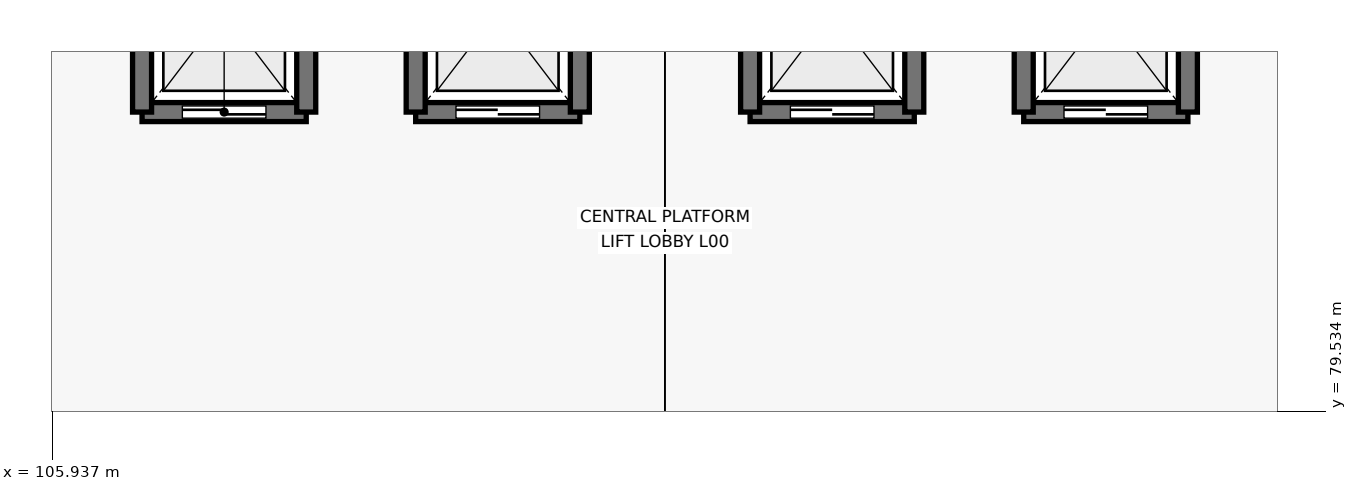
"""IFC4 building model, lengths in metres.
Left out: names, types, materials, properties, quantities, classifications, styles, units other than length and angle.
Written with IfcOpenShell. Run it as: python <this file> out.ifc"""

import sys

from ifc_helpers import new_model, si_unit, direction, frame, frame_2d, origin, place, context, subcontext, project, spatial, rectangle, extrude, element, fill, save


model = new_model("IFC4")
c1 = context("Model", 3, precision=1e-05, world=origin(), true_north=direction((0.0, 1.0)))
c2 = subcontext(c1, "Body", "Model", "MODEL_VIEW")
j1 = project(units=[si_unit("LENGTHUNIT", "METRE"), si_unit("PLANEANGLEUNIT", "RADIAN")], contexts=[c1])
p1 = place(None, origin())
s1 = spatial("IfcSite", under=j1, at=p1, CompositionType="ELEMENT")
p2 = place(p1, origin())
s2 = spatial("IfcBuilding", under=s1, at=p2, CompositionType="ELEMENT")
p3 = place(p2, origin())
s3 = spatial("IfcBuildingStorey", under=s2, at=p3, CompositionType="ELEMENT", Elevation=0.0)
p4 = place(p3, frame((107.12, 83.47, 0.0), z_axis=(0.0, 0.0, 1.0), x_axis=(1.0, 0.0, 0.0)))
e1 = element("IfcWall", 1, at=p4, inside=s3, PredefinedType="SHEAR", context=c2, shape_type="SweptSolid", body=[
    extrude(rectangle(XDim=2.16, YDim=0.25, at=frame_2d((1.08, 0.0))), origin(), (0.0, 0.0, 1.0), 5.18),
])
p5 = place(p4, frame((0.53, 0.0, 0.0)))
e2 = element("IfcOpeningElement", 2, at=p5, cuts=e1, PredefinedType="OPENING", context=c2, shape_type="SweptSolid", body=[
    extrude(rectangle(XDim=1.1, YDim=2.2, at=frame_2d((0.55, 1.1))), frame((0.0, 0.135, 0.0), z_axis=(0.0, -1.0, 0.0), x_axis=(1.0, 0.0, 0.0)), (0.0, 0.0, 1.0), 0.27),
])
for number, where, z_axis, x_axis in (
    (3, (109.28, 83.47, 0.0), (0.0, 0.0, 1.0), (0.0, 1.0, 0.0)),
    (4, (107.12, 86.13, 0.0), (0.0, 0.0, 1.0), (0.0, -1.0, 0.0)),
):
    element("IfcWall", number, at=place(p3, frame(where, z_axis=z_axis, x_axis=x_axis)), inside=s3, PredefinedType="SHEAR", context=c2, shape_type="SweptSolid", body=[
        extrude(rectangle(XDim=2.66, YDim=0.25, at=frame_2d((1.33, 0.0))), origin(), (0.0, 0.0, 1.0), 5.18),
    ])
p6 = place(p3, frame((110.72, 83.47, 0.0), z_axis=(0.0, 0.0, 1.0), x_axis=(1.0, 0.0, 0.0)))
e5 = element("IfcWall", 5, at=p6, inside=s3, PredefinedType="SHEAR", context=c2, shape_type="SweptSolid", body=[
    extrude(rectangle(XDim=2.16, YDim=0.25, at=frame_2d((1.08, 0.0))), origin(), (0.0, 0.0, 1.0), 5.18),
])
p7 = place(p6, frame((0.53, 0.0, 0.0)))
e6 = element("IfcOpeningElement", 6, at=p7, cuts=e5, PredefinedType="OPENING", context=c2, shape_type="SweptSolid", body=[
    extrude(rectangle(XDim=1.1, YDim=2.2, at=frame_2d((0.55, 1.1))), frame((0.0, 0.135, 0.0), z_axis=(0.0, -1.0, 0.0), x_axis=(1.0, 0.0, 0.0)), (0.0, 0.0, 1.0), 0.27),
])
for number, where, z_axis, x_axis in (
    (7, (112.88, 83.47, 0.0), (0.0, 0.0, 1.0), (0.0, 1.0, 0.0)),
    (8, (110.72, 86.13, 0.0), (0.0, 0.0, 1.0), (0.0, -1.0, 0.0)),
):
    element("IfcWall", number, at=place(p3, frame(where, z_axis=z_axis, x_axis=x_axis)), inside=s3, PredefinedType="SHEAR", context=c2, shape_type="SweptSolid", body=[
        extrude(rectangle(XDim=2.66, YDim=0.25, at=frame_2d((1.33, 0.0))), origin(), (0.0, 0.0, 1.0), 5.18),
    ])
p8 = place(p3, frame((115.12, 83.47, 0.0), z_axis=(0.0, 0.0, 1.0), x_axis=(1.0, 0.0, 0.0)))
e9 = element("IfcWall", 9, at=p8, inside=s3, PredefinedType="SHEAR", context=c2, shape_type="SweptSolid", body=[
    extrude(rectangle(XDim=2.16, YDim=0.25, at=frame_2d((1.08, 0.0))), origin(), (0.0, 0.0, 1.0), 5.18),
])
p9 = place(p8, frame((0.53, 0.0, 0.0)))
e10 = element("IfcOpeningElement", 10, at=p9, cuts=e9, PredefinedType="OPENING", context=c2, shape_type="SweptSolid", body=[
    extrude(rectangle(XDim=1.1, YDim=2.2, at=frame_2d((0.55, 1.1))), frame((0.0, 0.135, 0.0), z_axis=(0.0, -1.0, 0.0), x_axis=(1.0, 0.0, 0.0)), (0.0, 0.0, 1.0), 0.27),
])
for number, where, z_axis, x_axis in (
    (11, (117.28, 83.47, 0.0), (0.0, 0.0, 1.0), (0.0, 1.0, 0.0)),
    (12, (115.12, 86.13, 0.0), (0.0, 0.0, 1.0), (0.0, -1.0, 0.0)),
):
    element("IfcWall", number, at=place(p3, frame(where, z_axis=z_axis, x_axis=x_axis)), inside=s3, PredefinedType="SHEAR", context=c2, shape_type="SweptSolid", body=[
        extrude(rectangle(XDim=2.66, YDim=0.25, at=frame_2d((1.33, 0.0))), origin(), (0.0, 0.0, 1.0), 5.18),
    ])
p10 = place(p3, frame((118.72, 83.47, 0.0), z_axis=(0.0, 0.0, 1.0), x_axis=(1.0, 0.0, 0.0)))
e13 = element("IfcWall", 13, at=p10, inside=s3, PredefinedType="SHEAR", context=c2, shape_type="SweptSolid", body=[
    extrude(rectangle(XDim=2.16, YDim=0.25, at=frame_2d((1.08, 0.0))), origin(), (0.0, 0.0, 1.0), 5.18),
])
p11 = place(p10, frame((0.53, 0.0, 0.0)))
e14 = element("IfcOpeningElement", 14, at=p11, cuts=e13, PredefinedType="OPENING", context=c2, shape_type="SweptSolid", body=[
    extrude(rectangle(XDim=1.1, YDim=2.2, at=frame_2d((0.55, 1.1))), frame((0.0, 0.135, 0.0), z_axis=(0.0, -1.0, 0.0), x_axis=(1.0, 0.0, 0.0)), (0.0, 0.0, 1.0), 0.27),
])
for number, where, z_axis, x_axis in (
    (15, (120.88, 83.47, 0.0), (0.0, 0.0, 1.0), (0.0, 1.0, 0.0)),
    (16, (118.72, 86.13, 0.0), (0.0, 0.0, 1.0), (0.0, -1.0, 0.0)),
):
    element("IfcWall", number, at=place(p3, frame(where, z_axis=z_axis, x_axis=x_axis)), inside=s3, PredefinedType="SHEAR", context=c2, shape_type="SweptSolid", body=[
        extrude(rectangle(XDim=2.66, YDim=0.25, at=frame_2d((1.33, 0.0))), origin(), (0.0, 0.0, 1.0), 5.18),
    ])
p12 = place(p5, origin())
e17 = element("IfcDoor", 17, at=p12, inside=s3, OperationType="SLIDING_TO_RIGHT", PredefinedType="DOOR", context=c2, shape_type="SweptSolid", body=[
    extrude(rectangle(XDim=1.1, YDim=2.2, at=frame_2d((0.55, 1.1))), frame((0.0, 0.025, 0.0), z_axis=(0.0, -1.0, 0.0), x_axis=(1.0, 0.0, 0.0)), (0.0, 0.0, 1.0), 0.05),
])
fill(e2, e17)
p13 = place(p7, origin())
e18 = element("IfcDoor", 18, at=p13, inside=s3, OperationType="SLIDING_TO_RIGHT", PredefinedType="DOOR", context=c2, shape_type="SweptSolid", body=[
    extrude(rectangle(XDim=1.1, YDim=2.2, at=frame_2d((0.55, 1.1))), frame((0.0, 0.025, 0.0), z_axis=(0.0, -1.0, 0.0), x_axis=(1.0, 0.0, 0.0)), (0.0, 0.0, 1.0), 0.05),
])
fill(e6, e18)
p14 = place(p9, origin())
e19 = element("IfcDoor", 19, at=p14, inside=s3, OperationType="SLIDING_TO_RIGHT", PredefinedType="DOOR", context=c2, shape_type="SweptSolid", body=[
    extrude(rectangle(XDim=1.1, YDim=2.2, at=frame_2d((0.55, 1.1))), frame((0.0, 0.025, 0.0), z_axis=(0.0, -1.0, 0.0), x_axis=(1.0, 0.0, 0.0)), (0.0, 0.0, 1.0), 0.05),
])
fill(e10, e19)
p15 = place(p11, origin())
e20 = element("IfcDoor", 20, at=p15, inside=s3, OperationType="SLIDING_TO_RIGHT", PredefinedType="DOOR", context=c2, shape_type="SweptSolid", body=[
    extrude(rectangle(XDim=1.1, YDim=2.2, at=frame_2d((0.55, 1.1))), frame((0.0, 0.025, 0.0), z_axis=(0.0, -1.0, 0.0), x_axis=(1.0, 0.0, 0.0)), (0.0, 0.0, 1.0), 0.05),
])
fill(e14, e20)
save(model, sys.argv[1])
